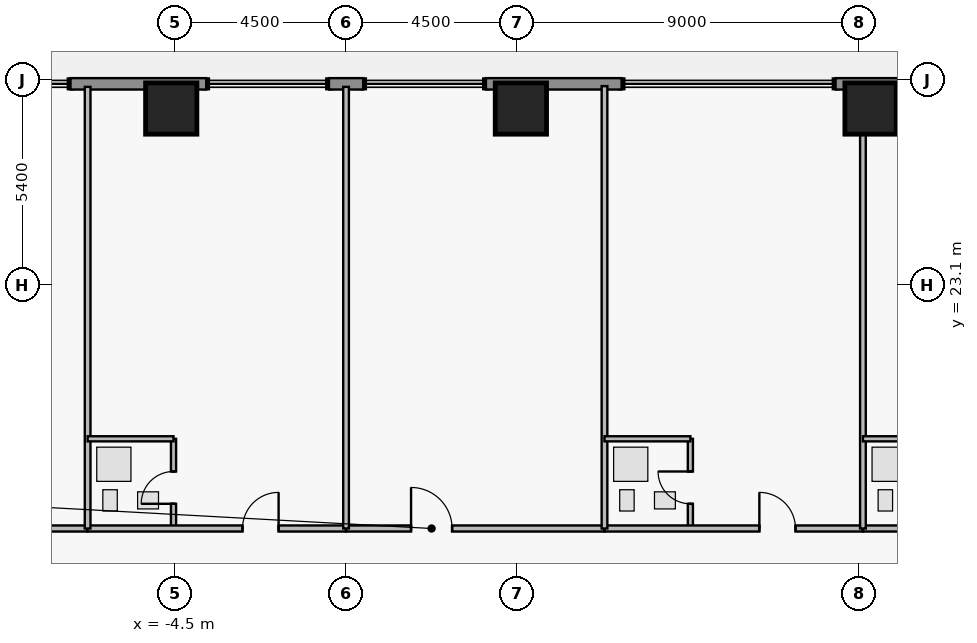
"""IFC4 building model, lengths in metres.
Left out: names, types, materials, properties, quantities, classifications, styles, units other than length and angle.
Written with IfcOpenShell. Run it as: python <this file> out.ifc"""

import sys

from ifc_helpers import new_model, si_unit, direction, frame, frame_2d, origin, origin_2d, place, context, subcontext, project, spatial, rectangle, extrude, element, fill, save


model = new_model("IFC4")
c1 = context("Model", 3, precision=1e-05, world=origin(), true_north=direction((0.0, 1.0)))
c2 = subcontext(c1, "Body", "Model", "MODEL_VIEW")
j1 = project(units=[si_unit("LENGTHUNIT", "METRE"), si_unit("PLANEANGLEUNIT", "RADIAN")], contexts=[c1])
p1 = place(None, origin())
s1 = spatial("IfcSite", under=j1, at=p1, CompositionType="ELEMENT")
p2 = place(p1, origin())
s2 = spatial("IfcBuilding", under=s1, at=p2, CompositionType="ELEMENT")
p3 = place(p2, frame((0.0, 0.0, 132.15)))
s3 = spatial("IfcBuildingStorey", under=s2, at=p3, CompositionType="ELEMENT", Elevation=132.15)
for number, where, z_axis, x_axis in (
    (1, (-4.6, 27.75, 0.0), (0.0, 0.0, 1.0), (1.0, 0.0, 0.0)),
    (2, (4.6, 27.75, 0.0), (0.0, 0.0, 1.0), (1.0, 0.0, 0.0)),
    (3, (13.8, 27.75, 0.0), (0.0, 0.0, 1.0), (1.0, 0.0, 0.0)),
):
    element("IfcColumn", number, at=place(p3, frame(where, z_axis=z_axis, x_axis=x_axis)), inside=s3, PredefinedType="COLUMN", context=c2, shape_type="SweptSolid", body=[
        extrude(rectangle(XDim=1.35, YDim=1.35, at=origin_2d()), origin(), (0.0, 0.0, 1.0), 3.65),
    ])
p4 = place(p3, frame((-7.25, 28.4, 0.0), z_axis=(0.0, 0.0, 1.0), x_axis=(1.0, 0.0, 0.0)))
e4 = element("IfcWall", 4, at=p4, inside=s3, PredefinedType="STANDARD", context=c2, shape_type="SweptSolid", body=[
    extrude(rectangle(XDim=3.57, YDim=0.3, at=frame_2d((1.785, 0.0))), origin(), (0.0, 0.0, 1.0), 3.43),
])
p5 = place(p3, frame((-0.45, 28.4, 0.0), z_axis=(0.0, 0.0, 1.0), x_axis=(1.0, 0.0, 0.0)))
e5 = element("IfcWall", 5, at=p5, inside=s3, PredefinedType="STANDARD", context=c2, shape_type="SweptSolid", body=[
    extrude(rectangle(XDim=0.9, YDim=0.3, at=frame_2d((0.45, 0.0))), origin(), (0.0, 0.0, 1.0), 3.43),
])
p6 = place(p3, frame((3.68, 28.4, 0.0), z_axis=(0.0, 0.0, 1.0), x_axis=(1.0, 0.0, 0.0)))
e6 = element("IfcWall", 6, at=p6, inside=s3, PredefinedType="STANDARD", context=c2, shape_type="SweptSolid", body=[
    extrude(rectangle(XDim=3.57, YDim=0.3, at=frame_2d((1.785, 0.0))), origin(), (0.0, 0.0, 1.0), 3.43),
])
p7 = place(p3, frame((12.88, 28.4, 0.0), z_axis=(0.0, 0.0, 1.0), x_axis=(1.0, 0.0, 0.0)))
e7 = element("IfcWall", 7, at=p7, inside=s3, PredefinedType="STANDARD", context=c2, shape_type="SweptSolid", body=[
    extrude(rectangle(XDim=1.84, YDim=0.3, at=frame_2d((0.92, 0.0))), origin(), (0.0, 0.0, 1.0), 3.43),
])
p8 = place(p3, frame((-13.6, 16.7, 0.0), z_axis=(0.0, 0.0, 1.0), x_axis=(1.0, 0.0, 0.0)))
e8 = element("IfcWall", 8, at=p8, inside=s3, PredefinedType="PARTITIONING", context=c2, shape_type="SweptSolid", body=[
    extrude(rectangle(XDim=6.8, YDim=0.16, at=frame_2d((3.4, 0.0))), origin(), (0.0, 0.0, 1.0), 2.973),
])
p9 = place(p8, frame((4.075, 0.0, 0.0)))
e9 = element("IfcOpeningElement", 9, at=p9, cuts=e8, PredefinedType="OPENING", context=c2, shape_type="SweptSolid", body=[
    extrude(rectangle(XDim=0.95, YDim=2.15, at=frame_2d((0.475, 1.075))), frame((0.0, 0.09, 0.0), z_axis=(0.0, -1.0, 0.0), x_axis=(1.0, 0.0, 0.0)), (0.0, 0.0, 1.0), 0.18),
])
p10 = place(p3, frame((-4.54, 16.7, 0.0), z_axis=(0.0, 0.0, 1.0), x_axis=(0.0, 1.0, 0.0)))
e10 = element("IfcWall", 10, at=p10, inside=s3, PredefinedType="PLUMBINGWALL", context=c2, shape_type="SweptSolid", body=[
    extrude(rectangle(XDim=2.36, YDim=0.135, at=frame_2d((1.18, 0.0))), origin(), (0.0, 0.0, 1.0), 2.503),
])
p11 = place(p10, frame((0.65, 0.0, 0.0)))
e11 = element("IfcOpeningElement", 11, at=p11, cuts=e10, PredefinedType="OPENING", context=c2, shape_type="SweptSolid", body=[
    extrude(rectangle(XDim=0.85, YDim=2.1, at=frame_2d((0.425, 1.05))), frame((0.0, 0.077, 0.0), z_axis=(0.0, -1.0, 0.0), x_axis=(1.0, 0.0, 0.0)), (0.0, 0.0, 1.0), 0.155),
])
p12 = place(p3, frame((-6.8, 16.7, 0.0), z_axis=(0.0, 0.0, 1.0), x_axis=(1.0, 0.0, 0.0)))
e12 = element("IfcWall", 12, at=p12, inside=s3, PredefinedType="PARTITIONING", context=c2, shape_type="SweptSolid", body=[
    extrude(rectangle(XDim=6.8, YDim=0.16, at=frame_2d((3.4, 0.0))), origin(), (0.0, 0.0, 1.0), 2.973),
])
p13 = place(p12, frame((4.075, 0.0, 0.0)))
e13 = element("IfcOpeningElement", 13, at=p13, cuts=e12, PredefinedType="OPENING", context=c2, shape_type="SweptSolid", body=[
    extrude(rectangle(XDim=0.95, YDim=2.15, at=frame_2d((0.475, 1.075))), frame((0.0, 0.09, 0.0), z_axis=(0.0, -1.0, 0.0), x_axis=(1.0, 0.0, 0.0)), (0.0, 0.0, 1.0), 0.18),
])
p14 = place(p3, frame((0.0, 16.7, 0.0), z_axis=(0.0, 0.0, 1.0), x_axis=(1.0, 0.0, 0.0)))
e14 = element("IfcWall", 14, at=p14, inside=s3, PredefinedType="PARTITIONING", context=c2, shape_type="SweptSolid", body=[
    extrude(rectangle(XDim=6.8, YDim=0.16, at=frame_2d((3.4, 0.0))), origin(), (0.0, 0.0, 1.0), 2.973),
])
p15 = place(p14, frame((1.71, 0.0, 0.0)))
e15 = element("IfcOpeningElement", 15, at=p15, cuts=e14, PredefinedType="OPENING", context=c2, shape_type="SweptSolid", body=[
    extrude(rectangle(XDim=1.08, YDim=2.18, at=frame_2d((0.54, 1.09))), frame((0.0, 0.09, 0.0), z_axis=(0.0, -1.0, 0.0), x_axis=(1.0, 0.0, 0.0)), (0.0, 0.0, 1.0), 0.18),
])
p16 = place(p3, frame((9.06, 16.7, 0.0), z_axis=(0.0, 0.0, 1.0), x_axis=(0.0, 1.0, 0.0)))
e16 = element("IfcWall", 16, at=p16, inside=s3, PredefinedType="PLUMBINGWALL", context=c2, shape_type="SweptSolid", body=[
    extrude(rectangle(XDim=2.36, YDim=0.135, at=frame_2d((1.18, 0.0))), origin(), (0.0, 0.0, 1.0), 3.43),
])
p17 = place(p16, frame((0.65, 0.0, 0.0)))
e17 = element("IfcOpeningElement", 17, at=p17, cuts=e16, PredefinedType="OPENING", context=c2, shape_type="SweptSolid", body=[
    extrude(rectangle(XDim=0.85, YDim=2.1, at=frame_2d((0.425, 1.05))), frame((0.0, 0.077, 0.0), z_axis=(0.0, -1.0, 0.0), x_axis=(1.0, 0.0, 0.0)), (0.0, 0.0, 1.0), 0.155),
])
p18 = place(p3, frame((6.8, 16.7, 0.0), z_axis=(0.0, 0.0, 1.0), x_axis=(1.0, 0.0, 0.0)))
e18 = element("IfcWall", 18, at=p18, inside=s3, PredefinedType="PARTITIONING", context=c2, shape_type="SweptSolid", body=[
    extrude(rectangle(XDim=6.8, YDim=0.16, at=frame_2d((3.4, 0.0))), origin(), (0.0, 0.0, 1.0), 2.973),
])
p19 = place(p18, frame((4.075, 0.0, 0.0)))
e19 = element("IfcOpeningElement", 19, at=p19, cuts=e18, PredefinedType="OPENING", context=c2, shape_type="SweptSolid", body=[
    extrude(rectangle(XDim=0.95, YDim=2.15, at=frame_2d((0.475, 1.075))), frame((0.0, 0.09, 0.0), z_axis=(0.0, -1.0, 0.0), x_axis=(1.0, 0.0, 0.0)), (0.0, 0.0, 1.0), 0.18),
])
p20 = place(p3, frame((13.6, 16.7, 0.0), z_axis=(0.0, 0.0, 1.0), x_axis=(1.0, 0.0, 0.0)))
e20 = element("IfcWall", 20, at=p20, inside=s3, PredefinedType="PARTITIONING", context=c2, shape_type="SweptSolid", body=[
    extrude(rectangle(XDim=7.0, YDim=0.16, at=frame_2d((3.5, 0.0))), origin(), (0.0, 0.0, 1.0), 3.43),
])
p21 = place(p20, frame((4.025, 0.0, 0.0)))
e21 = element("IfcOpeningElement", 21, at=p21, cuts=e20, PredefinedType="OPENING", context=c2, shape_type="SweptSolid", body=[
    extrude(rectangle(XDim=1.0, YDim=2.15, at=frame_2d((0.5, 1.075))), frame((0.0, 0.09, 0.0), z_axis=(0.0, -1.0, 0.0), x_axis=(1.0, 0.0, 0.0)), (0.0, 0.0, 1.0), 0.18),
])
p22 = place(p3, frame((-6.8, 16.7, 0.0), z_axis=(0.0, 0.0, 1.0), x_axis=(0.0, 1.0, 0.0)))
e22 = element("IfcWall", 22, at=p22, inside=s3, PredefinedType="PARTITIONING", context=c2, shape_type="SweptSolid", body=[
    extrude(rectangle(XDim=11.62, YDim=0.15, at=frame_2d((5.81, 0.0))), origin(), (0.0, 0.0, 1.0), 3.43),
])
p23 = place(p3, frame((-6.8, 19.06, 0.0), z_axis=(0.0, 0.0, 1.0), x_axis=(1.0, 0.0, 0.0)))
e23 = element("IfcWall", 23, at=p23, inside=s3, PredefinedType="PLUMBINGWALL", context=c2, shape_type="SweptSolid", body=[
    extrude(rectangle(XDim=2.26, YDim=0.135, at=frame_2d((1.13, 0.0))), origin(), (0.0, 0.0, 1.0), 2.973),
])
p24 = place(p3, frame((0.0, 16.7, 0.0), z_axis=(0.0, 0.0, 1.0), x_axis=(0.0, 1.0, 0.0)))
e24 = element("IfcWall", 24, at=p24, inside=s3, PredefinedType="PARTITIONING", context=c2, shape_type="SweptSolid", body=[
    extrude(rectangle(XDim=11.62, YDim=0.15, at=frame_2d((5.81, 0.0))), origin(), (0.0, 0.0, 1.0), 3.43),
])
p25 = place(p3, frame((6.8, 16.7, 0.0), z_axis=(0.0, 0.0, 1.0), x_axis=(0.0, 1.0, 0.0)))
e25 = element("IfcWall", 25, at=p25, inside=s3, PredefinedType="PARTITIONING", context=c2, shape_type="SweptSolid", body=[
    extrude(rectangle(XDim=11.64, YDim=0.15, at=frame_2d((5.82, 0.0))), origin(), (0.0, 0.0, 1.0), 3.43),
])
p26 = place(p3, frame((6.8, 19.06, 0.0), z_axis=(0.0, 0.0, 1.0), x_axis=(1.0, 0.0, 0.0)))
e26 = element("IfcWall", 26, at=p26, inside=s3, PredefinedType="PLUMBINGWALL", context=c2, shape_type="SweptSolid", body=[
    extrude(rectangle(XDim=2.26, YDim=0.135, at=frame_2d((1.13, 0.0))), origin(), (0.0, 0.0, 1.0), 2.973),
])
p27 = place(p3, frame((13.6, 16.7, 0.0), z_axis=(0.0, 0.0, 1.0), x_axis=(0.0, 1.0, 0.0)))
e27 = element("IfcWall", 27, at=p27, inside=s3, PredefinedType="PARTITIONING", context=c2, shape_type="SweptSolid", body=[
    extrude(rectangle(XDim=11.62, YDim=0.15, at=frame_2d((5.81, 0.0))), origin(), (0.0, 0.0, 1.0), 2.503),
])
p28 = place(p3, frame((13.6, 19.06, 0.0), z_axis=(0.0, 0.0, 1.0), x_axis=(1.0, 0.0, 0.0)))
e28 = element("IfcWall", 28, at=p28, inside=s3, PredefinedType="PLUMBINGWALL", context=c2, shape_type="SweptSolid", body=[
    extrude(rectangle(XDim=2.26, YDim=0.135, at=frame_2d((1.13, 0.0))), origin(), (0.0, 0.0, 1.0), 3.43),
])
p29 = place(p11, origin())
e29 = element("IfcDoor", 29, at=p29, inside=s3, OperationType="SINGLE_SWING_LEFT", PredefinedType="DOOR", context=c2, shape_type="SweptSolid", body=[
    extrude(rectangle(XDim=0.85, YDim=2.1, at=frame_2d((0.425, 1.05))), frame((0.0, 0.025, 0.0), z_axis=(0.0, -1.0, 0.0), x_axis=(1.0, 0.0, 0.0)), (0.0, 0.0, 1.0), 0.05),
])
fill(e11, e29)
p30 = place(p13, origin())
e30 = element("IfcDoor", 30, at=p30, inside=s3, OperationType="SINGLE_SWING_RIGHT", PredefinedType="DOOR", context=c2, shape_type="SweptSolid", body=[
    extrude(rectangle(XDim=0.95, YDim=2.15, at=frame_2d((0.475, 1.075))), frame((0.0, 0.025, 0.0), z_axis=(0.0, -1.0, 0.0), x_axis=(1.0, 0.0, 0.0)), (0.0, 0.0, 1.0), 0.05),
])
fill(e13, e30)
p31 = place(p15, origin())
e31 = element("IfcDoor", 31, at=p31, inside=s3, OperationType="SINGLE_SWING_LEFT", PredefinedType="DOOR", context=c2, shape_type="SweptSolid", body=[
    extrude(rectangle(XDim=1.08, YDim=2.18, at=frame_2d((0.54, 1.09))), frame((0.0, 0.025, 0.0), z_axis=(0.0, -1.0, 0.0), x_axis=(1.0, 0.0, 0.0)), (0.0, 0.0, 1.0), 0.05),
])
fill(e15, e31)
p32 = place(p17, origin())
e32 = element("IfcDoor", 32, at=p32, inside=s3, OperationType="SINGLE_SWING_RIGHT", PredefinedType="DOOR", context=c2, shape_type="SweptSolid", body=[
    extrude(rectangle(XDim=0.85, YDim=2.1, at=frame_2d((0.425, 1.05))), frame((0.0, 0.025, 0.0), z_axis=(0.0, -1.0, 0.0), x_axis=(1.0, 0.0, 0.0)), (0.0, 0.0, 1.0), 0.05),
])
fill(e17, e32)
p33 = place(p19, origin())
e33 = element("IfcDoor", 33, at=p33, inside=s3, OperationType="SINGLE_SWING_LEFT", PredefinedType="DOOR", context=c2, shape_type="SweptSolid", body=[
    extrude(rectangle(XDim=0.95, YDim=2.15, at=frame_2d((0.475, 1.075))), frame((0.0, 0.025, 0.0), z_axis=(0.0, -1.0, 0.0), x_axis=(1.0, 0.0, 0.0)), (0.0, 0.0, 1.0), 0.05),
])
fill(e19, e33)
save(model, sys.argv[1])
